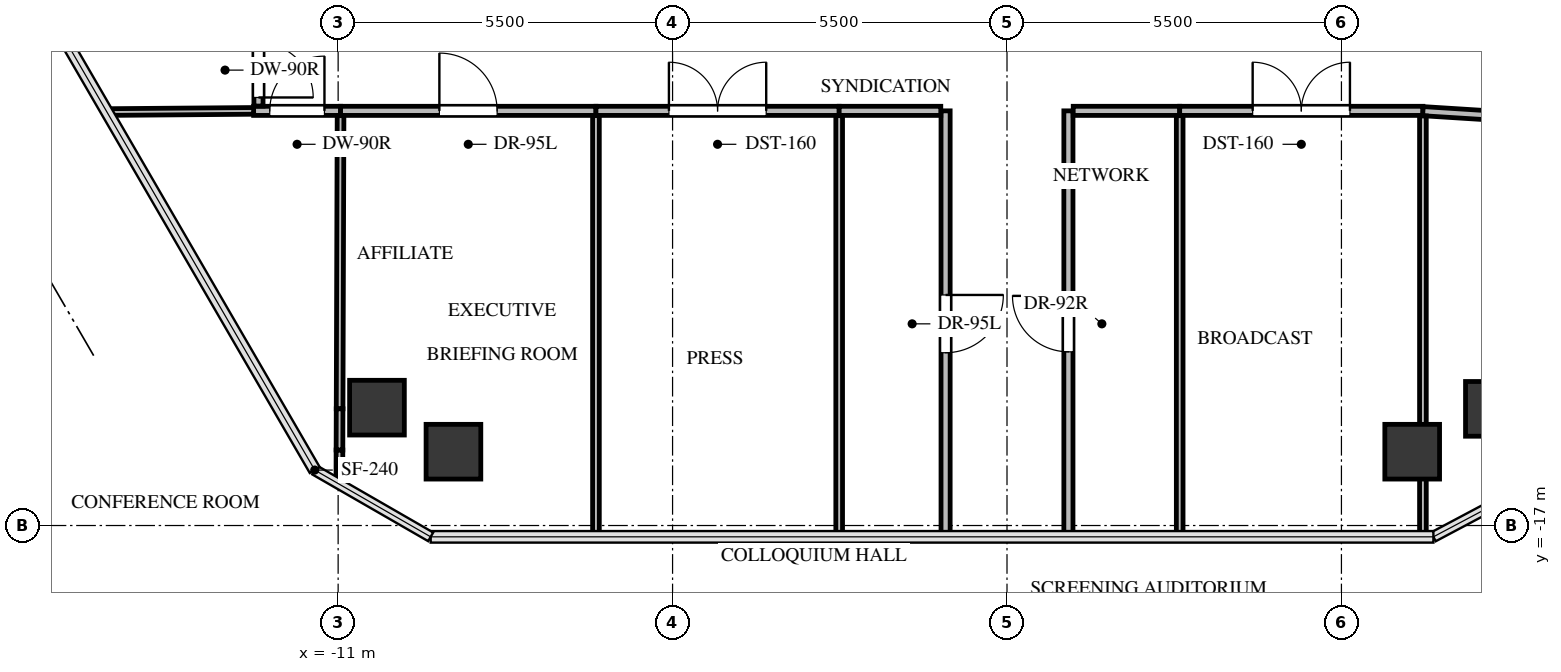
"""IFC4 building model, lengths in metres.
Left out: names, types, materials, properties, quantities, classifications, styles, units other than length and angle.
Written with IfcOpenShell. Run it as: python <this file> out.ifc"""

import sys

from ifc_helpers import new_model, si_unit, direction, frame, frame_2d, origin, origin_2d, place, context, subcontext, project, spatial, rectangle, extrude, source, transform, mapped, element, fill, save


model = new_model("IFC4")
c1 = context("Model", 3, precision=1e-05, world=origin(), true_north=direction((0.0, 1.0)))
c2 = subcontext(c1, "Body", "Model", "MODEL_VIEW")
j1 = project(units=[si_unit("LENGTHUNIT", "METRE"), si_unit("PLANEANGLEUNIT", "RADIAN")], contexts=[c1])
p1 = place(None, origin())
s1 = spatial("IfcSite", under=j1, at=p1, CompositionType="ELEMENT")
p2 = place(p1, origin())
s2 = spatial("IfcBuilding", under=s1, at=p2, CompositionType="ELEMENT")
p3 = place(p2, frame((0.0, 0.0, 248.0)))
s3 = spatial("IfcBuildingStorey", under=s2, at=p3, CompositionType="ELEMENT", Elevation=248.0)
m1 = source(origin(), c2, "Body", "SweptSolid", [
    extrude(rectangle(XDim=0.9, YDim=0.9, at=origin_2d()), origin(), (0.0, 0.0, 1.0), 3.3),
])
for number, where, z_axis, x_axis in (
    (1, (-10.361, -15.062, -0.24), (0.0, 0.0, 1.0), (1.0, 0.0, 0.0)),
    (2, (7.991, -15.081, -0.24), (0.0, 0.0, 1.0), (1.0, 0.0, 0.0)),
    (3, (6.664, -15.786, -0.24), (0.0, 0.0, 1.0), (1.0, 0.0, 0.0)),
    (4, (-9.104, -15.786, -0.24), (0.0, 0.0, 1.0), (1.0, 0.0, 0.0)),
):
    element("IfcColumn", number, at=place(p3, frame(where, z_axis=z_axis, x_axis=x_axis)), inside=s3, PredefinedType="COLUMN", context=c2, shape_type="MappedRepresentation", body=[
        mapped(m1, transform((0.0, 0.0, 0.0), x_axis=(1.0, 0.0, 0.0), y_axis=(0.0, 1.0, 0.0), z_axis=(0.0, 0.0, 1.0), scale=1.0)),
    ])
p4 = place(p3, frame((-12.39, -10.18, 0.0), z_axis=(0.0, 0.0, 1.0), x_axis=(1.0, 0.0, 0.0)))
e5 = element("IfcWall", 5, at=p4, inside=s3, PredefinedType="PARTITIONING", context=c2, shape_type="SweptSolid", body=[
    extrude(rectangle(XDim=1.43, YDim=0.15, at=frame_2d((0.715, 0.0))), origin(), (0.0, 0.0, 1.0), 3.045),
])
p5 = place(p4, frame((0.265, 0.0, 0.0)))
e6 = element("IfcOpeningElement", 6, at=p5, cuts=e5, PredefinedType="OPENING", context=c2, shape_type="SweptSolid", body=[
    extrude(rectangle(XDim=0.9, YDim=2.05, at=frame_2d((0.45, 1.025))), frame((0.0, 0.085, 0.0), z_axis=(0.0, -1.0, 0.0), x_axis=(1.0, 0.0, 0.0)), (0.0, 0.0, 1.0), 0.17),
])
p6 = place(p3, frame((-10.96, -10.18, 0.0), z_axis=(0.0, 0.0, 1.0), x_axis=(1.0, 0.0, 0.0)))
e7 = element("IfcWall", 7, at=p6, inside=s3, PredefinedType="PARTITIONING", context=c2, shape_type="SweptSolid", body=[
    extrude(rectangle(XDim=4.2, YDim=0.15, at=frame_2d((2.1, 0.0))), origin(), (0.0, 0.0, 1.0), 3.045),
])
p7 = place(p6, frame((1.625, 0.0, 0.0)))
e8 = element("IfcOpeningElement", 8, at=p7, cuts=e7, PredefinedType="OPENING", context=c2, shape_type="SweptSolid", body=[
    extrude(rectangle(XDim=0.95, YDim=2.1, at=frame_2d((0.475, 1.05))), frame((0.0, 0.085, 0.0), z_axis=(0.0, -1.0, 0.0), x_axis=(1.0, 0.0, 0.0)), (0.0, 0.0, 1.0), 0.17),
])
p8 = place(p3, frame((-6.76, -10.18, 0.0), z_axis=(0.0, 0.0, 1.0), x_axis=(1.0, 0.0, 0.0)))
e9 = element("IfcWall", 9, at=p8, inside=s3, PredefinedType="PARTITIONING", context=c2, shape_type="SweptSolid", body=[
    extrude(rectangle(XDim=4.0, YDim=0.15, at=frame_2d((2.0, 0.0))), origin(), (0.0, 0.0, 1.0), 2.301),
])
p9 = place(p8, frame((1.2, 0.0, 0.0)))
e10 = element("IfcOpeningElement", 10, at=p9, cuts=e9, PredefinedType="OPENING", context=c2, shape_type="SweptSolid", body=[
    extrude(rectangle(XDim=1.6, YDim=2.15, at=frame_2d((0.8, 1.075))), frame((0.0, 0.085, 0.0), z_axis=(0.0, -1.0, 0.0), x_axis=(1.0, 0.0, 0.0)), (0.0, 0.0, 1.0), 0.17),
])
p10 = place(p3, frame((-1.01, -10.18, 0.0), z_axis=(0.0, 0.0, 1.0), x_axis=(0.0, -1.0, 0.0)))
e11 = element("IfcWall", 11, at=p10, inside=s3, PredefinedType="PARTITIONING", context=c2, shape_type="SweptSolid", body=[
    extrude(rectangle(XDim=7.006, YDim=0.15, at=frame_2d((3.503, 0.0))), origin(), (0.0, 0.0, 1.0), 2.399),
])
p11 = place(p10, frame((3.028, 0.0, 0.0)))
e12 = element("IfcOpeningElement", 12, at=p11, cuts=e11, PredefinedType="OPENING", context=c2, shape_type="SweptSolid", body=[
    extrude(rectangle(XDim=0.95, YDim=2.1, at=frame_2d((0.475, 1.05))), frame((0.0, 0.085, 0.0), z_axis=(0.0, -1.0, 0.0), x_axis=(1.0, 0.0, 0.0)), (0.0, 0.0, 1.0), 0.17),
])
p12 = place(p3, frame((-2.76, -10.18, 0.0), z_axis=(0.0, 0.0, 1.0), x_axis=(1.0, 0.0, 0.0)))
e13 = element("IfcWall", 13, at=p12, inside=s3, PredefinedType="PARTITIONING", context=c2, shape_type="SweptSolid", body=[
    extrude(rectangle(XDim=1.671, YDim=0.15, at=frame_2d((0.835, 0.0))), origin(), (0.0, 0.0, 1.0), 3.045),
])
p13 = place(p3, frame((1.01, -17.186, 0.0), z_axis=(0.0, 0.0, 1.0), x_axis=(0.0, 1.0, 0.0)))
e14 = element("IfcWall", 14, at=p13, inside=s3, PredefinedType="PARTITIONING", context=c2, shape_type="SweptSolid", body=[
    extrude(rectangle(XDim=7.006, YDim=0.15, at=frame_2d((3.503, 0.0))), origin(), (0.0, 0.0, 1.0), 2.399),
])
p14 = place(p13, frame((3.043, 0.0, 0.0)))
e15 = element("IfcOpeningElement", 15, at=p14, cuts=e14, PredefinedType="OPENING", context=c2, shape_type="SweptSolid", body=[
    extrude(rectangle(XDim=0.92, YDim=2.1, at=frame_2d((0.46, 1.05))), frame((0.0, 0.085, 0.0), z_axis=(0.0, -1.0, 0.0), x_axis=(1.0, 0.0, 0.0)), (0.0, 0.0, 1.0), 0.17),
])
p15 = place(p3, frame((1.089, -10.18, 0.0), z_axis=(0.0, 0.0, 1.0), x_axis=(1.0, 0.0, 0.0)))
e16 = element("IfcWall", 16, at=p15, inside=s3, PredefinedType="PARTITIONING", context=c2, shape_type="SweptSolid", body=[
    extrude(rectangle(XDim=1.751, YDim=0.15, at=frame_2d((0.875, 0.0))), origin(), (0.0, 0.0, 1.0), 3.045),
])
p16 = place(p3, frame((2.84, -10.18, 0.0), z_axis=(0.0, 0.0, 1.0), x_axis=(1.0, 0.0, 0.0)))
e17 = element("IfcWall", 17, at=p16, inside=s3, PredefinedType="PARTITIONING", context=c2, shape_type="SweptSolid", body=[
    extrude(rectangle(XDim=4.0, YDim=0.15, at=frame_2d((2.0, 0.0))), origin(), (0.0, 0.0, 1.0), 2.301),
])
p17 = place(p16, frame((1.2, 0.0, 0.0)))
e18 = element("IfcOpeningElement", 18, at=p17, cuts=e17, PredefinedType="OPENING", context=c2, shape_type="SweptSolid", body=[
    extrude(rectangle(XDim=1.6, YDim=2.15, at=frame_2d((0.8, 1.075))), frame((0.0, 0.085, 0.0), z_axis=(0.0, -1.0, 0.0), x_axis=(1.0, 0.0, 0.0)), (0.0, 0.0, 1.0), 0.17),
])
p18 = place(p3, frame((6.84, -10.185, 0.0), z_axis=(0.0, 0.0, 1.0), x_axis=(0.99800894273, -0.063072579072, 0.0)))
e19 = element("IfcWall", 19, at=p18, inside=s3, PredefinedType="PARTITIONING", context=c2, shape_type="SweptSolid", body=[
    extrude(rectangle(XDim=5.911, YDim=0.15, at=frame_2d((2.955, 0.0))), origin(), (0.0, 0.0, 1.0), 2.399),
])
p19 = place(p18, frame((2.495, 0.0, 0.0)))
e20 = element("IfcOpeningElement", 20, at=p19, cuts=e19, PredefinedType="OPENING", context=c2, shape_type="SweptSolid", body=[
    extrude(rectangle(XDim=0.92, YDim=2.1, at=frame_2d((0.46, 1.05))), frame((0.0, 0.085, 0.0), z_axis=(0.0, -1.0, 0.0), x_axis=(1.0, 0.0, 0.0)), (0.0, 0.0, 1.0), 0.17),
])
p20 = place(p3, frame((-12.31, -8.919, 0.0), z_axis=(0.0, 0.0, 1.0), x_axis=(0.0, -1.0, 0.0)))
e21 = element("IfcWall", 21, at=p20, inside=s3, PredefinedType="PARTITIONING", context=c2, shape_type="SweptSolid", body=[
    extrude(rectangle(XDim=1.182, YDim=0.15, at=frame_2d((0.591, 0.0))), origin(), (0.0, 0.0, 1.0), 3.045),
])
p21 = place(p20, frame((0.141, 0.0, 0.0)))
e22 = element("IfcOpeningElement", 22, at=p21, cuts=e21, PredefinedType="OPENING", context=c2, shape_type="SweptSolid", body=[
    extrude(rectangle(XDim=0.9, YDim=2.05, at=frame_2d((0.45, 1.025))), frame((0.0, 0.085, 0.0), z_axis=(0.0, -1.0, 0.0), x_axis=(1.0, 0.0, 0.0)), (0.0, 0.0, 1.0), 0.17),
])
p22 = place(p3, frame((-10.96, -10.259, 0.0), z_axis=(0.0, 0.0, 1.0), x_axis=(-0.003240981611, -0.999994748005, 0.0)))
e23 = element("IfcWall", 23, at=p22, inside=s3, PredefinedType="MOVABLE", context=c2, shape_type="SweptSolid", body=[
    extrude(rectangle(XDim=4.821, YDim=0.11, at=frame_2d((2.411, 0.0))), origin(), (0.0, 0.0, 1.0), 2.399),
])
p23 = place(p3, frame((-10.978, -15.758, 0.0), z_axis=(0.0, 0.0, 1.0), x_axis=(-0.003467686129, -0.999993987558, 0.0)))
e24 = element("IfcWall", 24, at=p23, inside=s3, PredefinedType="MOVABLE", context=c2, shape_type="SweptSolid", body=[
    extrude(rectangle(XDim=0.563, YDim=0.11, at=frame_2d((0.282, 0.0))), origin(), (0.0, 0.0, 1.0), 3.045),
])
p24 = place(p3, frame((-10.976, -15.08, 0.0), z_axis=(0.0, 0.0, 1.0), x_axis=(-0.003242057889, -0.999994744517, 0.0)))
e25 = element("IfcWall", 25, at=p24, inside=s3, PredefinedType="MOVABLE", context=c2, shape_type="SweptSolid", body=[
    extrude(rectangle(XDim=0.678, YDim=0.11, at=frame_2d((0.339, 0.0))), origin(), (0.0, 0.0, 1.0), 1.877),
])
p25 = place(p3, frame((-14.802, -10.2, 0.0), z_axis=(0.0, 0.0, 1.0), x_axis=(0.999968020968, 0.007997314604, 0.0)))
e26 = element("IfcWall", 26, at=p25, inside=s3, PredefinedType="MOVABLE", context=c2, shape_type="SweptSolid", body=[
    extrude(rectangle(XDim=2.412, YDim=0.11, at=frame_2d((1.206, 0.0))), origin(), (0.0, 0.0, 1.0), 2.399),
])
p26 = place(p3, frame((-6.76, -10.259, 0.0), z_axis=(0.0, 0.0, 1.0), x_axis=(0.0, -1.0, 0.0)))
e27 = element("IfcWall", 27, at=p26, inside=s3, PredefinedType="MOVABLE", context=c2, shape_type="SweptSolid", body=[
    extrude(rectangle(XDim=6.927, YDim=0.11, at=frame_2d((3.463, 0.0))), origin(), (0.0, 0.0, 1.0), 2.301),
])
for number, where, z_axis, x_axis in (
    (28, (-2.76, -10.259, 0.0), (0.0, 0.0, 1.0), (0.0, -1.0, 0.0)),
    (29, (2.84, -10.259, 0.0), (0.0, 0.0, 1.0), (0.0, -1.0, 0.0)),
):
    element("IfcWall", number, at=place(p3, frame(where, z_axis=z_axis, x_axis=x_axis)), inside=s3, PredefinedType="MOVABLE", context=c2, shape_type="SweptSolid", body=[
        extrude(rectangle(XDim=6.927, YDim=0.11, at=frame_2d((3.463, 0.0))), origin(), (0.0, 0.0, 1.0), 2.399),
    ])
p27 = place(p3, frame((6.84, -10.264, 0.0), z_axis=(0.0, 0.0, 1.0), x_axis=(0.0, -1.0, 0.0)))
e30 = element("IfcWall", 30, at=p27, inside=s3, PredefinedType="MOVABLE", context=c2, shape_type="SweptSolid", body=[
    extrude(rectangle(XDim=5.606, YDim=0.11, at=frame_2d((2.803, 0.0))), origin(), (0.0, 0.0, 1.0), 2.301),
])
p28 = place(p3, frame((6.84, -15.87, 0.0), z_axis=(0.0, 0.0, 1.0), x_axis=(0.0, -1.0, 0.0)))
e31 = element("IfcWall", 31, at=p28, inside=s3, PredefinedType="MOVABLE", context=c2, shape_type="SweptSolid", body=[
    extrude(rectangle(XDim=1.316, YDim=0.11, at=frame_2d((0.658, 0.0))), origin(), (0.0, 0.0, 1.0), 1.877),
])
m2 = source(origin(), c2, "Body", "SweptSolid", [
    extrude(rectangle(XDim=0.9, YDim=2.05, at=frame_2d((0.45, 1.025))), frame((0.0, 0.025, 0.0), z_axis=(0.0, -1.0, 0.0), x_axis=(1.0, 0.0, 0.0)), (0.0, 0.0, 1.0), 0.05),
])
p29 = place(p5, origin())
e32 = element("IfcDoor", 32, at=p29, inside=s3, OperationType="SINGLE_SWING_RIGHT", PredefinedType="DOOR", context=c2, shape_type="MappedRepresentation", body=[
    mapped(m2, transform((0.0, 0.0, 0.0), x_axis=(1.0, 0.0, 0.0), y_axis=(0.0, 1.0, 0.0), z_axis=(0.0, 0.0, 1.0), scale=1.0)),
])
fill(e6, e32)
m3 = source(origin(), c2, "Body", "SweptSolid", [
    extrude(rectangle(XDim=0.95, YDim=2.1, at=frame_2d((0.475, 1.05))), frame((0.0, 0.025, 0.0), z_axis=(0.0, -1.0, 0.0), x_axis=(1.0, 0.0, 0.0)), (0.0, 0.0, 1.0), 0.05),
])
p30 = place(p7, origin())
e33 = element("IfcDoor", 33, at=p30, inside=s3, OperationType="SINGLE_SWING_LEFT", PredefinedType="DOOR", context=c2, shape_type="MappedRepresentation", body=[
    mapped(m3, transform((0.0, 0.0, 0.0), x_axis=(1.0, 0.0, 0.0), y_axis=(0.0, 1.0, 0.0), z_axis=(0.0, 0.0, 1.0), scale=1.0)),
])
fill(e8, e33)
m4 = source(origin(), c2, "Body", "SweptSolid", [
    extrude(rectangle(XDim=1.6, YDim=2.15, at=frame_2d((0.8, 1.075))), frame((0.0, 0.025, 0.0), z_axis=(0.0, -1.0, 0.0), x_axis=(1.0, 0.0, 0.0)), (0.0, 0.0, 1.0), 0.05),
])
p31 = place(p9, origin())
e34 = element("IfcDoor", 34, at=p31, inside=s3, OperationType="DOUBLE_DOOR_SINGLE_SWING", PredefinedType="DOOR", context=c2, shape_type="MappedRepresentation", body=[
    mapped(m4, transform((0.0, 0.0, 0.0), x_axis=(1.0, 0.0, 0.0), y_axis=(0.0, 1.0, 0.0), z_axis=(0.0, 0.0, 1.0), scale=1.0)),
])
fill(e10, e34)
p32 = place(p11, origin())
e35 = element("IfcDoor", 35, at=p32, inside=s3, OperationType="SINGLE_SWING_LEFT", PredefinedType="DOOR", context=c2, shape_type="MappedRepresentation", body=[
    mapped(m3, transform((0.0, 0.0, 0.0), x_axis=(1.0, 0.0, 0.0), y_axis=(0.0, 1.0, 0.0), z_axis=(0.0, 0.0, 1.0), scale=1.0)),
])
fill(e12, e35)
m5 = source(origin(), c2, "Body", "SweptSolid", [
    extrude(rectangle(XDim=0.92, YDim=2.1, at=frame_2d((0.46, 1.05))), frame((0.0, 0.025, 0.0), z_axis=(0.0, -1.0, 0.0), x_axis=(1.0, 0.0, 0.0)), (0.0, 0.0, 1.0), 0.05),
])
p33 = place(p14, origin())
e36 = element("IfcDoor", 36, at=p33, inside=s3, OperationType="SINGLE_SWING_RIGHT", PredefinedType="DOOR", context=c2, shape_type="MappedRepresentation", body=[
    mapped(m5, transform((0.0, 0.0, 0.0), x_axis=(1.0, 0.0, 0.0), y_axis=(0.0, 1.0, 0.0), z_axis=(0.0, 0.0, 1.0), scale=1.0)),
])
fill(e15, e36)
p34 = place(p17, origin())
e37 = element("IfcDoor", 37, at=p34, inside=s3, OperationType="DOUBLE_DOOR_SINGLE_SWING", PredefinedType="DOOR", context=c2, shape_type="MappedRepresentation", body=[
    mapped(m4, transform((0.0, 0.0, 0.0), x_axis=(1.0, 0.0, 0.0), y_axis=(0.0, 1.0, 0.0), z_axis=(0.0, 0.0, 1.0), scale=1.0)),
])
fill(e18, e37)
p35 = place(p21, origin())
e38 = element("IfcDoor", 38, at=p35, inside=s3, OperationType="SINGLE_SWING_RIGHT", PredefinedType="DOOR", context=c2, shape_type="MappedRepresentation", body=[
    mapped(m2, transform((0.0, 0.0, 0.0), x_axis=(1.0, 0.0, 0.0), y_axis=(0.0, 1.0, 0.0), z_axis=(0.0, 0.0, 1.0), scale=1.0)),
])
fill(e22, e38)
save(model, sys.argv[1])
